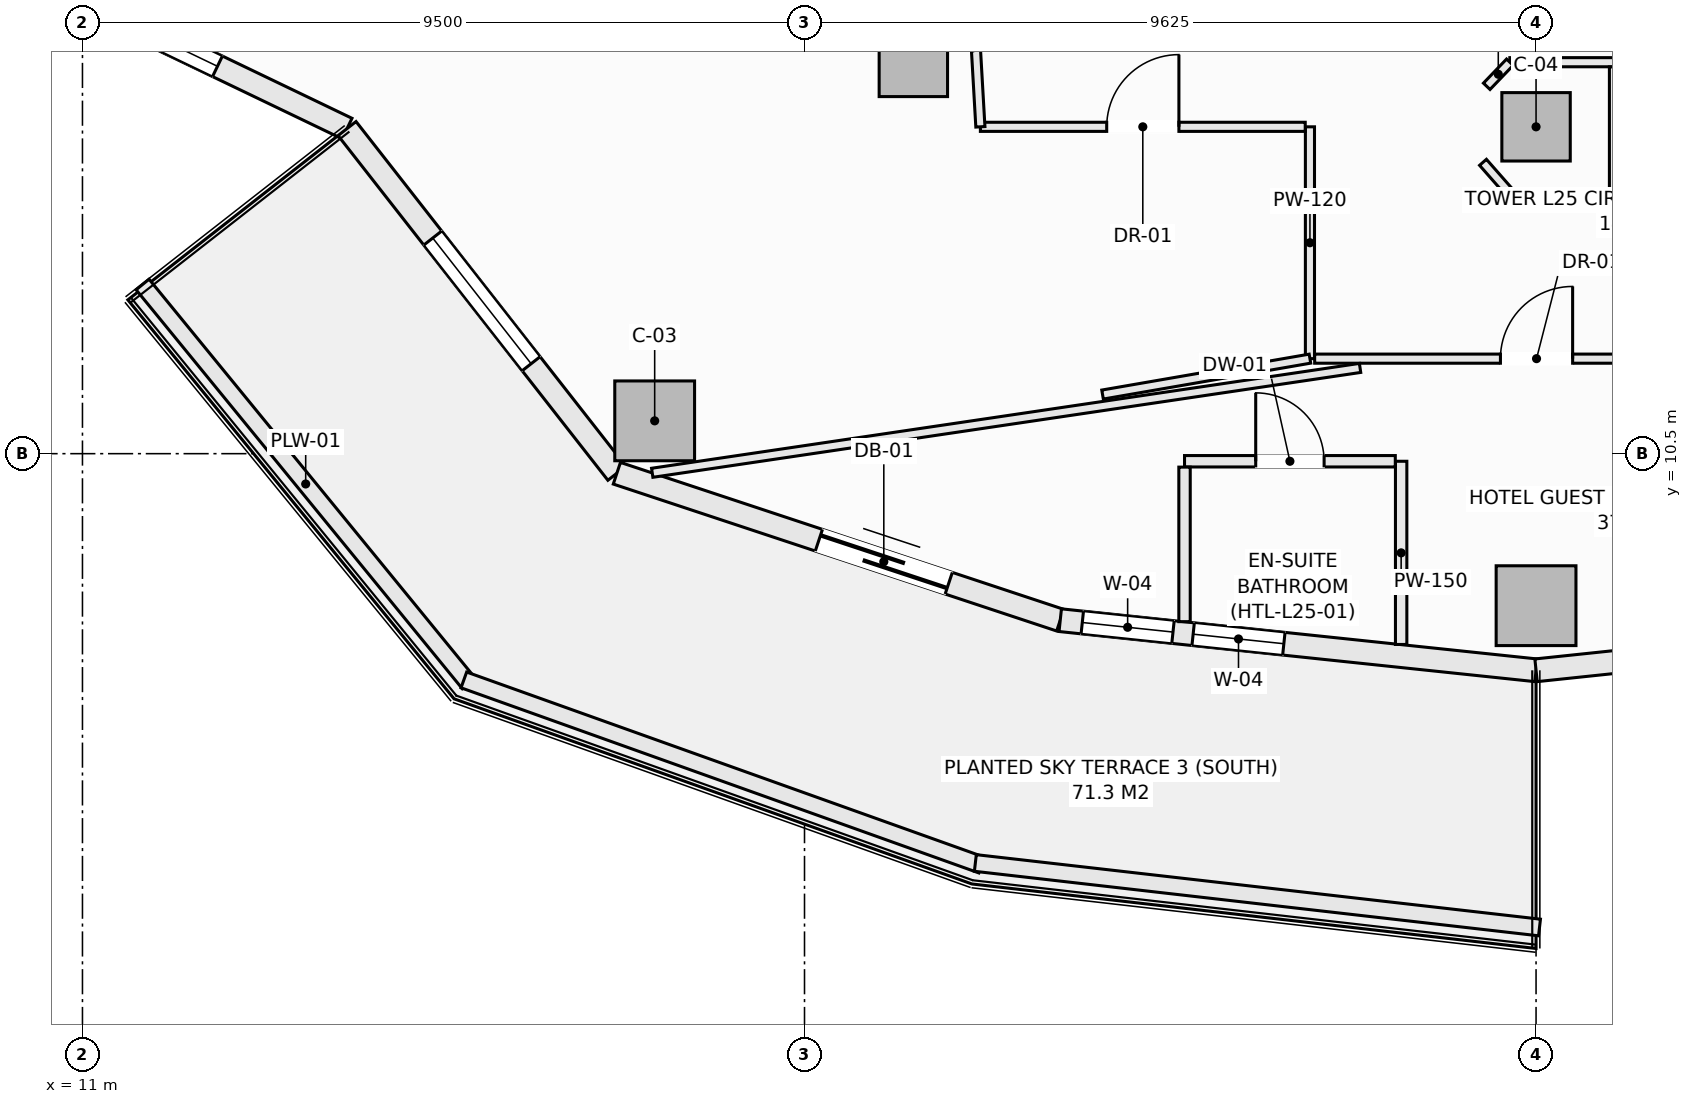
"""IFC4 building model, lengths in metres.
Left out: names, types, materials, properties, quantities, classifications, styles, units other than length and angle.
Written with IfcOpenShell. Run it as: python <this file> out.ifc"""

import sys

from ifc_helpers import new_model, si_unit, direction, frame, frame_2d, origin, origin_2d, place, context, subcontext, project, spatial, rectangle, extrude, element, fill, save


model = new_model("IFC4")
c1 = context("Model", 3, precision=1e-05, world=origin(), true_north=direction((0.0, 1.0)))
c2 = subcontext(c1, "Body", "Model", "MODEL_VIEW")
j1 = project(units=[si_unit("LENGTHUNIT", "METRE"), si_unit("PLANEANGLEUNIT", "RADIAN")], contexts=[c1])
p1 = place(None, origin())
s1 = spatial("IfcSite", under=j1, at=p1, CompositionType="ELEMENT")
p2 = place(p1, origin())
s2 = spatial("IfcBuilding", under=s1, at=p2, CompositionType="ELEMENT")
p3 = place(p2, frame((0.0, 0.0, 105.3)))
s3 = spatial("IfcBuildingStorey", under=s2, at=p3, CompositionType="ELEMENT", Elevation=105.3)
for number, where, z_axis, x_axis in (
    (1, (18.529, 10.932, -0.27), (0.0, 0.0, 1.0), (1.0, 0.0, 0.0)),
    (2, (30.125, 8.5, -0.27), (0.0, 0.0, 1.0), (1.0, 0.0, 0.0)),
):
    element("IfcColumn", number, at=place(p3, frame(where, z_axis=z_axis, x_axis=x_axis)), inside=s3, PredefinedType="COLUMN", context=c2, shape_type="SweptSolid", body=[
        extrude(rectangle(XDim=1.05, YDim=1.05, at=origin_2d()), origin(), (0.0, 0.0, 1.0), 3.4),
    ])
for number, where, z_axis, x_axis in (
    (3, (21.932, 15.648, -0.27), (0.0, 0.0, 1.0), (1.0, 0.0, 0.0)),
    (4, (30.125, 14.8, -0.27), (0.0, 0.0, 1.0), (1.0, 0.0, 0.0)),
):
    element("IfcColumn", number, at=place(p3, frame(where, z_axis=z_axis, x_axis=x_axis)), inside=s3, PredefinedType="COLUMN", context=c2, shape_type="SweptSolid", body=[
        extrude(rectangle(XDim=0.9, YDim=0.9, at=origin_2d()), origin(), (0.0, 0.0, 1.0), 3.4),
    ])
p4 = place(p3, frame((9.178, 17.325, 0.0), z_axis=(0.0, 0.0, 1.0), x_axis=(0.901370184739, -0.433049408339, 0.0)))
e5 = element("IfcWall", 5, at=p4, inside=s3, PredefinedType="SOLIDWALL", context=c2, shape_type="SweptSolid", body=[
    extrude(rectangle(XDim=5.884, YDim=0.3, at=frame_2d((2.942, 0.0))), origin(), (0.0, 0.0, 1.0), 2.653),
])
p5 = place(p4, frame((1.892, 0.0, 0.74)))
e6 = element("IfcOpeningElement", 6, at=p5, cuts=e5, PredefinedType="OPENING", context=c2, shape_type="SweptSolid", body=[
    extrude(rectangle(XDim=2.1, YDim=1.7, at=frame_2d((1.05, 0.85))), frame((0.0, 0.16, 0.0), z_axis=(0.0, -1.0, 0.0), x_axis=(1.0, 0.0, 0.0)), (0.0, 0.0, 1.0), 0.32),
])
p6 = place(p3, frame((14.481, 14.777, 0.0), z_axis=(0.0, 0.0, 1.0), x_axis=(0.616435134162, -0.787405693001, 0.0)))
e7 = element("IfcWall", 7, at=p6, inside=s3, PredefinedType="SOLIDWALL", context=c2, shape_type="SweptSolid", body=[
    extrude(rectangle(XDim=5.759, YDim=0.3, at=frame_2d((2.879, 0.0))), origin(), (0.0, 0.0, 1.0), 2.653),
])
p7 = place(p6, frame((1.829, 0.0, 0.74)))
e8 = element("IfcOpeningElement", 8, at=p7, cuts=e7, PredefinedType="OPENING", context=c2, shape_type="SweptSolid", body=[
    extrude(rectangle(XDim=2.1, YDim=1.7, at=frame_2d((1.05, 0.85))), frame((0.0, 0.16, 0.0), z_axis=(0.0, -1.0, 0.0), x_axis=(1.0, 0.0, 0.0)), (0.0, 0.0, 1.0), 0.32),
])
p8 = place(p3, frame((18.031, 10.242, 0.0), z_axis=(0.0, 0.0, 1.0), x_axis=(0.949238009374, -0.314558741032, 0.0)))
e9 = element("IfcWall", 9, at=p8, inside=s3, PredefinedType="SOLIDWALL", context=c2, shape_type="SweptSolid", body=[
    extrude(rectangle(XDim=6.146, YDim=0.3, at=frame_2d((3.073, 0.0))), origin(), (0.0, 0.0, 1.0), 2.653),
])
p9 = place(p8, frame((2.8, 0.0, 0.0)))
e10 = element("IfcOpeningElement", 10, at=p9, cuts=e9, PredefinedType="OPENING", context=c2, shape_type="SweptSolid", body=[
    extrude(rectangle(XDim=1.8, YDim=2.25, at=frame_2d((0.9, 1.125))), frame((0.0, 0.16, 0.0), z_axis=(0.0, -1.0, 0.0), x_axis=(1.0, 0.0, 0.0)), (0.0, 0.0, 1.0), 0.32),
])
p10 = place(p3, frame((23.865, 8.309, 0.0), z_axis=(0.0, 0.0, 1.0), x_axis=(0.994498012394, -0.104755445421, 0.0)))
e11 = element("IfcWall", 11, at=p10, inside=s3, PredefinedType="SOLIDWALL", context=c2, shape_type="SweptSolid", body=[
    extrude(rectangle(XDim=6.295, YDim=0.3, at=frame_2d((3.147, 0.0))), origin(), (0.0, 0.0, 1.0), 2.653),
])
p11 = place(p10, frame((0.292, 0.0, 0.74)))
e12 = element("IfcOpeningElement", 12, at=p11, cuts=e11, PredefinedType="OPENING", context=c2, shape_type="SweptSolid", body=[
    extrude(rectangle(XDim=1.2, YDim=1.7, at=frame_2d((0.6, 0.85))), frame((0.0, 0.16, 0.0), z_axis=(0.0, -1.0, 0.0), x_axis=(1.0, 0.0, 0.0)), (0.0, 0.0, 1.0), 0.32),
])
p12 = place(p10, frame((1.758, 0.0, 0.74)))
e13 = element("IfcOpeningElement", 13, at=p12, cuts=e11, PredefinedType="OPENING", context=c2, shape_type="SweptSolid", body=[
    extrude(rectangle(XDim=1.2, YDim=1.7, at=frame_2d((0.6, 0.85))), frame((0.0, 0.16, 0.0), z_axis=(0.0, -1.0, 0.0), x_axis=(1.0, 0.0, 0.0)), (0.0, 0.0, 1.0), 0.32),
])
p13 = place(p3, frame((30.125, 7.65, 0.0), z_axis=(0.0, 0.0, 1.0), x_axis=(0.994498012394, 0.104755445421, 0.0)))
e14 = element("IfcWall", 14, at=p13, inside=s3, PredefinedType="SOLIDWALL", context=c2, shape_type="SweptSolid", body=[
    extrude(rectangle(XDim=6.295, YDim=0.3, at=frame_2d((3.147, 0.0))), origin(), (0.0, 0.0, 1.0), 2.653),
])
p14 = place(p13, frame((2.097, 0.0, 0.74)))
e15 = element("IfcOpeningElement", 15, at=p14, cuts=e14, PredefinedType="OPENING", context=c2, shape_type="SweptSolid", body=[
    extrude(rectangle(XDim=2.1, YDim=1.7, at=frame_2d((1.05, 0.85))), frame((0.0, 0.16, 0.0), z_axis=(0.0, -1.0, 0.0), x_axis=(1.0, 0.0, 0.0)), (0.0, 0.0, 1.0), 0.32),
])
p15 = place(p3, frame((11.791, 12.726, 0.0), z_axis=(0.0, 0.0, 1.0), x_axis=(0.633002467947, -0.77414977593, 0.0)))
e16 = element("IfcWall", 16, at=p15, inside=s3, PredefinedType="PARAPET", context=c2, shape_type="SweptSolid", body=[
    extrude(rectangle(XDim=6.78, YDim=0.22, at=frame_2d((3.39, 0.0))), origin(), (0.0, 0.0, 1.0), 0.52),
])
p16 = place(p3, frame((16.018, 7.523, 0.0), z_axis=(0.0, 0.0, 1.0), x_axis=(0.941632697311, -0.336642040387, 0.0)))
e17 = element("IfcWall", 17, at=p16, inside=s3, PredefinedType="PARAPET", context=c2, shape_type="SweptSolid", body=[
    extrude(rectangle(XDim=7.236, YDim=0.22, at=frame_2d((3.618, 0.0))), origin(), (0.0, 0.0, 1.0), 0.52),
])
p17 = place(p3, frame((22.748, 5.115, 0.0), z_axis=(0.0, 0.0, 1.0), x_axis=(0.993527615836, -0.11359082961, 0.0)))
e18 = element("IfcWall", 18, at=p17, inside=s3, PredefinedType="PARAPET", context=c2, shape_type="SweptSolid", body=[
    extrude(rectangle(XDim=7.471, YDim=0.22, at=frame_2d((3.735, 0.0))), origin(), (0.0, 0.0, 1.0), 0.52),
])
p18 = place(p3, frame((27.15, 11.75, 0.0), z_axis=(0.0, 0.0, 1.0), x_axis=(0.0, 1.0, 0.0)))
e19 = element("IfcWall", 19, at=p18, inside=s3, PredefinedType="PARTITIONING", context=c2, shape_type="SweptSolid", body=[
    extrude(rectangle(XDim=3.05, YDim=0.12, at=frame_2d((1.525, 0.0))), origin(), (0.0, 0.0, 1.0), 3.13),
])
p19 = place(p3, frame((29.78, 15.65, 0.0), z_axis=(0.0, 0.0, 1.0), x_axis=(1.0, 0.0, 0.0)))
e20 = element("IfcWall", 20, at=p19, inside=s3, PredefinedType="PARTITIONING", context=c2, shape_type="SweptSolid", body=[
    extrude(rectangle(XDim=1.37, YDim=0.12, at=frame_2d((0.685, 0.0))), origin(), (0.0, 0.0, 1.0), 3.13),
])
p20 = place(p3, frame((27.212, 11.75, 0.0), z_axis=(0.0, 0.0, 1.0), x_axis=(1.0, 0.0, 0.0)))
e21 = element("IfcWall", 21, at=p20, inside=s3, PredefinedType="PARTITIONING", context=c2, shape_type="SweptSolid", body=[
    extrude(rectangle(XDim=8.676, YDim=0.12, at=frame_2d((4.338, 0.0))), origin(), (0.0, 0.0, 1.0), 3.13),
])
p21 = place(p20, frame((2.444, 0.0, 0.0)))
e22 = element("IfcOpeningElement", 22, at=p21, cuts=e21, PredefinedType="OPENING", context=c2, shape_type="SweptSolid", body=[
    extrude(rectangle(XDim=0.95, YDim=2.1, at=frame_2d((0.475, 1.05))), frame((0.0, 0.07, 0.0), z_axis=(0.0, -1.0, 0.0), x_axis=(1.0, 0.0, 0.0)), (0.0, 0.0, 1.0), 0.14),
])
p22 = place(p20, frame((6.415, 0.0, 0.0)))
e23 = element("IfcOpeningElement", 23, at=p22, cuts=e21, PredefinedType="OPENING", context=c2, shape_type="SweptSolid", body=[
    extrude(rectangle(XDim=0.95, YDim=2.1, at=frame_2d((0.475, 1.05))), frame((0.0, 0.07, 0.0), z_axis=(0.0, -1.0, 0.0), x_axis=(1.0, 0.0, 0.0)), (0.0, 0.0, 1.0), 0.14),
])
p23 = place(p3, frame((22.814, 14.8, 0.0), z_axis=(0.0, 0.0, 1.0), x_axis=(1.0, 0.0, 0.0)))
e24 = element("IfcWall", 24, at=p23, inside=s3, PredefinedType="PARTITIONING", context=c2, shape_type="SweptSolid", body=[
    extrude(rectangle(XDim=4.274, YDim=0.12, at=frame_2d((2.137, 0.0))), origin(), (0.0, 0.0, 1.0), 3.13),
])
p24 = place(p23, frame((1.662, 0.0, 0.0)))
e25 = element("IfcOpeningElement", 25, at=p24, cuts=e24, PredefinedType="OPENING", context=c2, shape_type="SweptSolid", body=[
    extrude(rectangle(XDim=0.95, YDim=2.1, at=frame_2d((0.475, 1.05))), frame((0.0, 0.07, 0.0), z_axis=(0.0, -1.0, 0.0), x_axis=(1.0, 0.0, 0.0)), (0.0, 0.0, 1.0), 0.14),
])
p25 = place(p3, frame((22.756, 15.811, 0.0), z_axis=(0.0, 0.0, 1.0), x_axis=(0.057139047697, -0.998366230012, 0.0)))
e26 = element("IfcWall", 26, at=p25, inside=s3, PredefinedType="PARTITIONING", context=c2, shape_type="SweptSolid", body=[
    extrude(rectangle(XDim=1.013, YDim=0.12, at=frame_2d((0.506, 0.0))), origin(), (0.0, 0.0, 1.0), 3.13),
])
p26 = place(p3, frame((29.427, 14.333, 0.0), z_axis=(0.0, 0.0, 1.0), x_axis=(0.659763469355, -0.751473329204, 0.0)))
e27 = element("IfcWall", 27, at=p26, inside=s3, PredefinedType="PARTITIONING", context=c2, shape_type="SweptSolid", body=[
    extrude(rectangle(XDim=0.535, YDim=0.12, at=frame_2d((0.268, 0.0))), origin(), (0.0, 0.0, 1.0), 3.13),
])
p27 = place(p3, frame((29.78, 13.85, 0.0), z_axis=(0.0, 0.0, 1.0), x_axis=(1.0, 0.0, 0.0)))
e28 = element("IfcWall", 28, at=p27, inside=s3, PredefinedType="PARTITIONING", context=c2, shape_type="SweptSolid", body=[
    extrude(rectangle(XDim=1.37, YDim=0.12, at=frame_2d((0.685, 0.0))), origin(), (0.0, 0.0, 1.0), 3.13),
])
p28 = place(p3, frame((31.15, 13.912, 0.0), z_axis=(0.0, 0.0, 1.0), x_axis=(0.0, 1.0, 0.0)))
e29 = element("IfcWall", 29, at=p28, inside=s3, PredefinedType="PARTITIONING", context=c2, shape_type="SweptSolid", body=[
    extrude(rectangle(XDim=1.676, YDim=0.12, at=frame_2d((0.838, 0.0))), origin(), (0.0, 0.0, 1.0), 3.13),
])
p29 = place(p3, frame((29.476, 15.333, 0.0), z_axis=(0.0, 0.0, 1.0), x_axis=(0.692219273951, 0.721687243043, 0.0)))
e30 = element("IfcWall", 30, at=p29, inside=s3, PredefinedType="PARTITIONING", context=c2, shape_type="SweptSolid", body=[
    extrude(rectangle(XDim=0.439, YDim=0.12, at=frame_2d((0.22, 0.0))), origin(), (0.0, 0.0, 1.0), 3.13),
])
p30 = place(p3, frame((18.496, 10.248, 0.0), z_axis=(0.0, 0.0, 1.0), x_axis=(0.989204993819, 0.14653832333, 0.0)))
e31 = element("IfcWall", 31, at=p30, inside=s3, PredefinedType="PARTITIONING", context=c2, shape_type="SweptSolid", body=[
    extrude(rectangle(XDim=9.415, YDim=0.12, at=frame_2d((4.708, 0.0))), origin(), (0.0, 0.0, 1.0), 2.653),
])
p31 = place(p3, frame((28.35, 7.99, 0.0), z_axis=(0.0, 0.0, 1.0), x_axis=(0.0, 1.0, 0.0)))
e32 = element("IfcWall", 32, at=p31, inside=s3, PredefinedType="PARTITIONING", context=c2, shape_type="SweptSolid", body=[
    extrude(rectangle(XDim=2.41, YDim=0.15, at=frame_2d((1.205, 0.0))), origin(), (0.0, 0.0, 1.0), 3.13),
])
p32 = place(p3, frame((25.5, 10.4, 0.0), z_axis=(0.0, 0.0, 1.0), x_axis=(1.0, 0.0, 0.0)))
e33 = element("IfcWall", 33, at=p32, inside=s3, PredefinedType="PARTITIONING", context=c2, shape_type="SweptSolid", body=[
    extrude(rectangle(XDim=2.773, YDim=0.15, at=frame_2d((1.386, 0.0))), origin(), (0.0, 0.0, 1.0), 3.13),
])
p33 = place(p32, frame((0.937, 0.0, 0.0)))
e34 = element("IfcOpeningElement", 34, at=p33, cuts=e33, PredefinedType="OPENING", context=c2, shape_type="SweptSolid", body=[
    extrude(rectangle(XDim=0.9, YDim=2.1, at=frame_2d((0.45, 1.05))), frame((0.0, 0.085, 0.0), z_axis=(0.0, -1.0, 0.0), x_axis=(1.0, 0.0, 0.0)), (0.0, 0.0, 1.0), 0.17),
])
p34 = place(p3, frame((25.5, 8.29, 0.0), z_axis=(0.0, 0.0, 1.0), x_axis=(0.0, 1.0, 0.0)))
e35 = element("IfcWall", 35, at=p34, inside=s3, PredefinedType="PARTITIONING", context=c2, shape_type="SweptSolid", body=[
    extrude(rectangle(XDim=2.033, YDim=0.15, at=frame_2d((1.017, 0.0))), origin(), (0.0, 0.0, 1.0), 3.13),
])
p35 = place(p3, frame((24.421, 11.278, 0.0), z_axis=(0.0, 0.0, 1.0), x_axis=(0.98534024709, 0.170600695966, 0.0)))
e36 = element("IfcWall", 36, at=p35, inside=s3, PredefinedType="PARTITIONING", context=c2, shape_type="SweptSolid", body=[
    extrude(rectangle(XDim=2.769, YDim=0.12, at=frame_2d((1.385, 0.0))), origin(), (0.0, 0.0, 1.0), 3.13),
])
p36 = place(p5, origin())
e37 = element("IfcWindow", 37, at=p36, inside=s3, PartitioningType="SINGLE_PANEL", PredefinedType="WINDOW", context=c2, shape_type="SweptSolid", body=[
    extrude(rectangle(XDim=2.1, YDim=1.7, at=frame_2d((1.05, 0.85))), frame((0.0, 0.03, 0.0), z_axis=(0.0, -1.0, 0.0), x_axis=(1.0, 0.0, 0.0)), (0.0, 0.0, 1.0), 0.06),
])
fill(e6, e37)
p37 = place(p7, origin())
e38 = element("IfcWindow", 38, at=p37, inside=s3, PartitioningType="SINGLE_PANEL", PredefinedType="WINDOW", context=c2, shape_type="SweptSolid", body=[
    extrude(rectangle(XDim=2.1, YDim=1.7, at=frame_2d((1.05, 0.85))), frame((0.0, 0.03, 0.0), z_axis=(0.0, -1.0, 0.0), x_axis=(1.0, 0.0, 0.0)), (0.0, 0.0, 1.0), 0.06),
])
fill(e8, e38)
p38 = place(p9, frame((1.8, 0.0, 0.0), z_axis=(0.0, 0.0, 1.0), x_axis=(-1.0, 0.0, 0.0)))
e39 = element("IfcDoor", 39, at=p38, inside=s3, OperationType="SLIDING_TO_LEFT", PredefinedType="DOOR", context=c2, shape_type="SweptSolid", body=[
    extrude(rectangle(XDim=1.8, YDim=2.25, at=frame_2d((0.9, 1.125))), frame((0.0, 0.025, 0.0), z_axis=(0.0, -1.0, 0.0), x_axis=(1.0, 0.0, 0.0)), (0.0, 0.0, 1.0), 0.05),
])
fill(e10, e39)
p39 = place(p11, origin())
e40 = element("IfcWindow", 40, at=p39, inside=s3, PartitioningType="SINGLE_PANEL", PredefinedType="WINDOW", context=c2, shape_type="SweptSolid", body=[
    extrude(rectangle(XDim=1.2, YDim=1.7, at=frame_2d((0.6, 0.85))), frame((0.0, 0.03, 0.0), z_axis=(0.0, -1.0, 0.0), x_axis=(1.0, 0.0, 0.0)), (0.0, 0.0, 1.0), 0.06),
])
fill(e12, e40)
p40 = place(p21, origin())
e41 = element("IfcDoor", 41, at=p40, inside=s3, OperationType="SINGLE_SWING_RIGHT", PredefinedType="DOOR", context=c2, shape_type="SweptSolid", body=[
    extrude(rectangle(XDim=0.95, YDim=2.1, at=frame_2d((0.475, 1.05))), frame((0.0, 0.025, 0.0), z_axis=(0.0, -1.0, 0.0), x_axis=(1.0, 0.0, 0.0)), (0.0, 0.0, 1.0), 0.05),
])
fill(e22, e41)
p41 = place(p24, origin())
e42 = element("IfcDoor", 42, at=p41, inside=s3, OperationType="SINGLE_SWING_RIGHT", PredefinedType="DOOR", context=c2, shape_type="SweptSolid", body=[
    extrude(rectangle(XDim=0.95, YDim=2.1, at=frame_2d((0.475, 1.05))), frame((0.0, 0.025, 0.0), z_axis=(0.0, -1.0, 0.0), x_axis=(1.0, 0.0, 0.0)), (0.0, 0.0, 1.0), 0.05),
])
fill(e25, e42)
p42 = place(p33, origin())
e43 = element("IfcDoor", 43, at=p42, inside=s3, OperationType="SINGLE_SWING_LEFT", PredefinedType="DOOR", context=c2, shape_type="SweptSolid", body=[
    extrude(rectangle(XDim=0.9, YDim=2.1, at=frame_2d((0.45, 1.05))), frame((0.0, 0.025, 0.0), z_axis=(0.0, -1.0, 0.0), x_axis=(1.0, 0.0, 0.0)), (0.0, 0.0, 1.0), 0.05),
])
fill(e34, e43)
p43 = place(p12, origin())
e44 = element("IfcWindow", 44, at=p43, inside=s3, PartitioningType="SINGLE_PANEL", PredefinedType="WINDOW", context=c2, shape_type="SweptSolid", body=[
    extrude(rectangle(XDim=1.2, YDim=1.7, at=frame_2d((0.6, 0.85))), frame((0.0, 0.03, 0.0), z_axis=(0.0, -1.0, 0.0), x_axis=(1.0, 0.0, 0.0)), (0.0, 0.0, 1.0), 0.06),
])
fill(e13, e44)
save(model, sys.argv[1])
